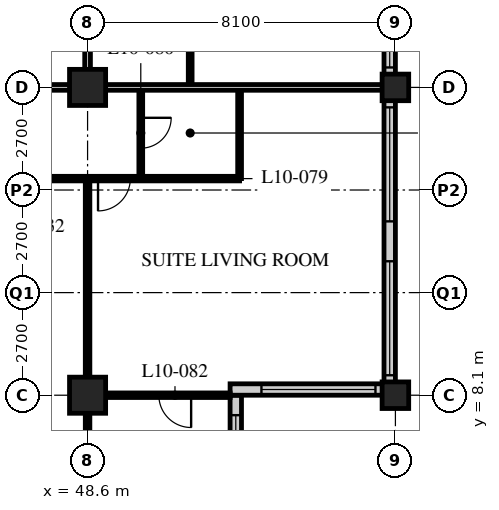
"""IFC4 building model, lengths in metres.
Left out: names, types, materials, properties, quantities, classifications, styles, units other than length and angle.
Written with IfcOpenShell. Run it as: python <this file> out.ifc"""

import sys

from ifc_helpers import new_model, si_unit, direction, frame, frame_2d, origin, origin_2d, place, context, subcontext, project, spatial, rectangle, hollow_rectangle, extrude, element, fill, save


model = new_model("IFC4")
c1 = context("Model", 3, precision=1e-05, world=origin(), true_north=direction((0.0, 1.0)))
c2 = subcontext(c1, "Body", "Model", "MODEL_VIEW")
j1 = project(units=[si_unit("LENGTHUNIT", "METRE"), si_unit("PLANEANGLEUNIT", "RADIAN")], contexts=[c1])
p1 = place(None, origin())
s1 = spatial("IfcSite", under=j1, at=p1, CompositionType="ELEMENT")
p2 = place(p1, origin())
s2 = spatial("IfcBuilding", under=s1, at=p2, CompositionType="ELEMENT")
p3 = place(p2, frame((0.0, 0.0, 46.6)))
s3 = spatial("IfcBuildingStorey", under=s2, at=p3, CompositionType="ELEMENT", Elevation=46.6)
for number, where, z_axis, x_axis in (
    (1, (48.6, 8.1, 0.0), (0.0, 0.0, 1.0), (1.0, 0.0, 0.0)),
    (2, (48.6, 16.2, 0.0), (0.0, 0.0, 1.0), (1.0, 0.0, 0.0)),
):
    element("IfcColumn", number, at=place(p3, frame(where, z_axis=z_axis, x_axis=x_axis)), inside=s3, PredefinedType="COLUMN", context=c2, shape_type="SweptSolid", body=[
        extrude(hollow_rectangle(XDim=0.95, YDim=0.95, WallThickness=0.095, at=origin_2d()), origin(), (0.0, 0.0, 1.0), 3.4),
    ])
for number, where, z_axis, x_axis in (
    (3, (56.7, 8.1, 0.0), (0.0, 0.0, 1.0), (1.0, 0.0, 0.0)),
    (4, (56.7, 16.2, 0.0), (0.0, 0.0, 1.0), (1.0, 0.0, 0.0)),
):
    element("IfcColumn", number, at=place(p3, frame(where, z_axis=z_axis, x_axis=x_axis)), inside=s3, PredefinedType="COLUMN", context=c2, shape_type="SweptSolid", body=[
        extrude(hollow_rectangle(XDim=0.7, YDim=0.7, WallThickness=0.06, at=origin_2d()), origin(), (0.0, 0.0, 1.0), 3.4),
    ])
p4 = place(p3, frame((52.5, 4.35, 0.0), z_axis=(0.0, 0.0, 1.0), x_axis=(0.0, 1.0, 0.0)))
e5 = element("IfcWall", 5, at=p4, inside=s3, PredefinedType="SOLIDWALL", context=c2, shape_type="SweptSolid", body=[
    extrude(rectangle(XDim=3.75, YDim=0.3, at=frame_2d((1.875, 0.0))), origin(), (0.0, 0.0, 1.0), 3.19),
])
p5 = place(p4, frame((0.225, 0.0, 0.9)))
e6 = element("IfcOpeningElement", 6, at=p5, cuts=e5, PredefinedType="OPENING", context=c2, shape_type="SweptSolid", body=[
    extrude(rectangle(XDim=3.0, YDim=1.5, at=frame_2d((1.5, 0.75))), frame((0.0, 0.16, 0.0), z_axis=(0.0, -1.0, 0.0), x_axis=(1.0, 0.0, 0.0)), (0.0, 0.0, 1.0), 0.32),
])
p6 = place(p3, frame((52.35, 8.25, 0.0), z_axis=(0.0, 0.0, 1.0), x_axis=(1.0, 0.0, 0.0)))
e7 = element("IfcWall", 7, at=p6, inside=s3, PredefinedType="SOLIDWALL", context=c2, shape_type="SweptSolid", body=[
    extrude(rectangle(XDim=4.35, YDim=0.3, at=frame_2d((2.175, 0.0))), origin(), (0.0, 0.0, 1.0), 3.19),
])
p7 = place(p6, frame((0.825, 0.0, 0.9)))
e8 = element("IfcOpeningElement", 8, at=p7, cuts=e7, PredefinedType="OPENING", context=c2, shape_type="SweptSolid", body=[
    extrude(rectangle(XDim=3.0, YDim=1.5, at=frame_2d((1.5, 0.75))), frame((0.0, 0.16, 0.0), z_axis=(0.0, -1.0, 0.0), x_axis=(1.0, 0.0, 0.0)), (0.0, 0.0, 1.0), 0.32),
])
p8 = place(p3, frame((56.55, 8.4, 0.0), z_axis=(0.0, 0.0, 1.0), x_axis=(0.0, 1.0, 0.0)))
e9 = element("IfcWall", 9, at=p8, inside=s3, PredefinedType="SOLIDWALL", context=c2, shape_type="SweptSolid", body=[
    extrude(rectangle(XDim=32.1, YDim=0.3, at=frame_2d((16.05, 0.0))), origin(), (0.0, 0.0, 1.0), 3.19),
])
p9 = place(p8, frame((0.225, 0.0, 0.9)))
e10 = element("IfcOpeningElement", 10, at=p9, cuts=e9, PredefinedType="OPENING", context=c2, shape_type="SweptSolid", body=[
    extrude(rectangle(XDim=3.0, YDim=2.0, at=frame_2d((1.5, 1.0))), frame((0.0, 0.16, 0.0), z_axis=(0.0, -1.0, 0.0), x_axis=(1.0, 0.0, 0.0)), (0.0, 0.0, 1.0), 0.32),
])
p10 = place(p8, frame((4.275, 0.0, 0.9)))
e11 = element("IfcOpeningElement", 11, at=p10, cuts=e9, PredefinedType="OPENING", context=c2, shape_type="SweptSolid", body=[
    extrude(rectangle(XDim=3.0, YDim=2.0, at=frame_2d((1.5, 1.0))), frame((0.0, 0.16, 0.0), z_axis=(0.0, -1.0, 0.0), x_axis=(1.0, 0.0, 0.0)), (0.0, 0.0, 1.0), 0.32),
])
p11 = place(p8, frame((8.325, 0.0, 0.9)))
e12 = element("IfcOpeningElement", 12, at=p11, cuts=e9, PredefinedType="OPENING", context=c2, shape_type="SweptSolid", body=[
    extrude(rectangle(XDim=3.0, YDim=2.0, at=frame_2d((1.5, 1.0))), frame((0.0, 0.16, 0.0), z_axis=(0.0, -1.0, 0.0), x_axis=(1.0, 0.0, 0.0)), (0.0, 0.0, 1.0), 0.32),
])
p12 = place(p8, frame((12.375, 0.0, 0.9)))
e13 = element("IfcOpeningElement", 13, at=p12, cuts=e9, PredefinedType="OPENING", context=c2, shape_type="SweptSolid", body=[
    extrude(rectangle(XDim=3.0, YDim=2.0, at=frame_2d((1.5, 1.0))), frame((0.0, 0.16, 0.0), z_axis=(0.0, -1.0, 0.0), x_axis=(1.0, 0.0, 0.0)), (0.0, 0.0, 1.0), 0.32),
])
p13 = place(p8, frame((16.425, 0.0, 0.9)))
e14 = element("IfcOpeningElement", 14, at=p13, cuts=e9, PredefinedType="OPENING", context=c2, shape_type="SweptSolid", body=[
    extrude(rectangle(XDim=3.0, YDim=2.0, at=frame_2d((1.5, 1.0))), frame((0.0, 0.16, 0.0), z_axis=(0.0, -1.0, 0.0), x_axis=(1.0, 0.0, 0.0)), (0.0, 0.0, 1.0), 0.32),
])
p14 = place(p8, frame((20.475, 0.0, 0.9)))
e15 = element("IfcOpeningElement", 15, at=p14, cuts=e9, PredefinedType="OPENING", context=c2, shape_type="SweptSolid", body=[
    extrude(rectangle(XDim=3.0, YDim=2.0, at=frame_2d((1.5, 1.0))), frame((0.0, 0.16, 0.0), z_axis=(0.0, -1.0, 0.0), x_axis=(1.0, 0.0, 0.0)), (0.0, 0.0, 1.0), 0.32),
])
p15 = place(p8, frame((24.525, 0.0, 0.9)))
e16 = element("IfcOpeningElement", 16, at=p15, cuts=e9, PredefinedType="OPENING", context=c2, shape_type="SweptSolid", body=[
    extrude(rectangle(XDim=3.0, YDim=2.0, at=frame_2d((1.5, 1.0))), frame((0.0, 0.16, 0.0), z_axis=(0.0, -1.0, 0.0), x_axis=(1.0, 0.0, 0.0)), (0.0, 0.0, 1.0), 0.32),
])
p16 = place(p8, frame((28.575, 0.0, 0.9)))
e17 = element("IfcOpeningElement", 17, at=p16, cuts=e9, PredefinedType="OPENING", context=c2, shape_type="SweptSolid", body=[
    extrude(rectangle(XDim=3.0, YDim=2.0, at=frame_2d((1.5, 1.0))), frame((0.0, 0.16, 0.0), z_axis=(0.0, -1.0, 0.0), x_axis=(1.0, 0.0, 0.0)), (0.0, 0.0, 1.0), 0.32),
])
p17 = place(p3, frame((8.1, 16.2, 0.0), z_axis=(0.0, 0.0, 1.0), x_axis=(1.0, 0.0, 0.0)))
e18 = element("IfcWall", 18, at=p17, inside=s3, PredefinedType="PARTITIONING", context=c2, shape_type="SweptSolid", body=[
    extrude(rectangle(XDim=40.5, YDim=0.15, at=frame_2d((20.25, 0.0))), origin(), (0.0, 0.0, 1.0), 2.578),
])
p18 = place(p17, frame((4.35, 0.0, 0.0)))
e19 = element("IfcOpeningElement", 19, at=p18, cuts=e18, PredefinedType="OPENING", context=c2, shape_type="SweptSolid", body=[
    extrude(rectangle(XDim=1.0, YDim=2.1, at=frame_2d((0.5, 1.05))), frame((0.0, 0.085, 0.0), z_axis=(0.0, -1.0, 0.0), x_axis=(1.0, 0.0, 0.0)), (0.0, 0.0, 1.0), 0.17),
])
p19 = place(p17, frame((10.85, 0.0, 0.0)))
e20 = element("IfcOpeningElement", 20, at=p19, cuts=e18, PredefinedType="OPENING", context=c2, shape_type="SweptSolid", body=[
    extrude(rectangle(XDim=1.0, YDim=2.1, at=frame_2d((0.5, 1.05))), frame((0.0, 0.085, 0.0), z_axis=(0.0, -1.0, 0.0), x_axis=(1.0, 0.0, 0.0)), (0.0, 0.0, 1.0), 0.17),
])
p20 = place(p17, frame((12.75, 0.0, 0.0)))
e21 = element("IfcOpeningElement", 21, at=p20, cuts=e18, PredefinedType="OPENING", context=c2, shape_type="SweptSolid", body=[
    extrude(rectangle(XDim=1.0, YDim=2.1, at=frame_2d((0.5, 1.05))), frame((0.0, 0.085, 0.0), z_axis=(0.0, -1.0, 0.0), x_axis=(1.0, 0.0, 0.0)), (0.0, 0.0, 1.0), 0.17),
])
p21 = place(p17, frame((18.95, 0.0, 0.0)))
e22 = element("IfcOpeningElement", 22, at=p21, cuts=e18, PredefinedType="OPENING", context=c2, shape_type="SweptSolid", body=[
    extrude(rectangle(XDim=1.0, YDim=2.1, at=frame_2d((0.5, 1.05))), frame((0.0, 0.085, 0.0), z_axis=(0.0, -1.0, 0.0), x_axis=(1.0, 0.0, 0.0)), (0.0, 0.0, 1.0), 0.17),
])
p22 = place(p17, frame((20.55, 0.0, 0.0)))
e23 = element("IfcOpeningElement", 23, at=p22, cuts=e18, PredefinedType="OPENING", context=c2, shape_type="SweptSolid", body=[
    extrude(rectangle(XDim=1.0, YDim=2.1, at=frame_2d((0.5, 1.05))), frame((0.0, 0.085, 0.0), z_axis=(0.0, -1.0, 0.0), x_axis=(1.0, 0.0, 0.0)), (0.0, 0.0, 1.0), 0.17),
])
p23 = place(p17, frame((27.05, 0.0, 0.0)))
e24 = element("IfcOpeningElement", 24, at=p23, cuts=e18, PredefinedType="OPENING", context=c2, shape_type="SweptSolid", body=[
    extrude(rectangle(XDim=1.0, YDim=2.1, at=frame_2d((0.5, 1.05))), frame((0.0, 0.085, 0.0), z_axis=(0.0, -1.0, 0.0), x_axis=(1.0, 0.0, 0.0)), (0.0, 0.0, 1.0), 0.17),
])
p24 = place(p17, frame((28.95, 0.0, 0.0)))
e25 = element("IfcOpeningElement", 25, at=p24, cuts=e18, PredefinedType="OPENING", context=c2, shape_type="SweptSolid", body=[
    extrude(rectangle(XDim=1.0, YDim=2.1, at=frame_2d((0.5, 1.05))), frame((0.0, 0.085, 0.0), z_axis=(0.0, -1.0, 0.0), x_axis=(1.0, 0.0, 0.0)), (0.0, 0.0, 1.0), 0.17),
])
p25 = place(p17, frame((34.85, 0.0, 0.0)))
e26 = element("IfcOpeningElement", 26, at=p25, cuts=e18, PredefinedType="OPENING", context=c2, shape_type="SweptSolid", body=[
    extrude(rectangle(XDim=1.0, YDim=2.1, at=frame_2d((0.5, 1.05))), frame((0.0, 0.085, 0.0), z_axis=(0.0, -1.0, 0.0), x_axis=(1.0, 0.0, 0.0)), (0.0, 0.0, 1.0), 0.17),
])
p26 = place(p17, frame((1.525, 0.0, 0.0)))
e27 = element("IfcOpeningElement", 27, at=p26, cuts=e18, PredefinedType="OPENING", context=c2, shape_type="SweptSolid", body=[
    extrude(rectangle(XDim=1.0, YDim=2.1, at=frame_2d((0.5, 1.05))), frame((0.0, 0.085, 0.0), z_axis=(0.0, -1.0, 0.0), x_axis=(1.0, 0.0, 0.0)), (0.0, 0.0, 1.0), 0.17),
])
p27 = place(p17, frame((37.975, 0.0, 0.0)))
e28 = element("IfcOpeningElement", 28, at=p27, cuts=e18, PredefinedType="OPENING", context=c2, shape_type="SweptSolid", body=[
    extrude(rectangle(XDim=1.0, YDim=2.1, at=frame_2d((0.5, 1.05))), frame((0.0, 0.085, 0.0), z_axis=(0.0, -1.0, 0.0), x_axis=(1.0, 0.0, 0.0)), (0.0, 0.0, 1.0), 0.17),
])
p28 = place(p3, frame((48.6, 16.2, 0.0), z_axis=(0.0, 0.0, 1.0), x_axis=(0.0, 1.0, 0.0)))
e29 = element("IfcWall", 29, at=p28, inside=s3, PredefinedType="PARTITIONING", context=c2, shape_type="SweptSolid", body=[
    extrude(rectangle(XDim=26.1, YDim=0.15, at=frame_2d((13.05, 0.0))), origin(), (0.0, 0.0, 1.0), 2.578),
])
p29 = place(p28, frame((2.75, 0.0, 0.0)))
e30 = element("IfcOpeningElement", 30, at=p29, cuts=e29, PredefinedType="OPENING", context=c2, shape_type="SweptSolid", body=[
    extrude(rectangle(XDim=1.0, YDim=2.1, at=frame_2d((0.5, 1.05))), frame((0.0, 0.085, 0.0), z_axis=(0.0, -1.0, 0.0), x_axis=(1.0, 0.0, 0.0)), (0.0, 0.0, 1.0), 0.17),
])
p30 = place(p28, frame((4.35, 0.0, 0.0)))
e31 = element("IfcOpeningElement", 31, at=p30, cuts=e29, PredefinedType="OPENING", context=c2, shape_type="SweptSolid", body=[
    extrude(rectangle(XDim=1.0, YDim=2.1, at=frame_2d((0.5, 1.05))), frame((0.0, 0.085, 0.0), z_axis=(0.0, -1.0, 0.0), x_axis=(1.0, 0.0, 0.0)), (0.0, 0.0, 1.0), 0.17),
])
p31 = place(p28, frame((10.85, 0.0, 0.0)))
e32 = element("IfcOpeningElement", 32, at=p31, cuts=e29, PredefinedType="OPENING", context=c2, shape_type="SweptSolid", body=[
    extrude(rectangle(XDim=1.0, YDim=2.1, at=frame_2d((0.5, 1.05))), frame((0.0, 0.085, 0.0), z_axis=(0.0, -1.0, 0.0), x_axis=(1.0, 0.0, 0.0)), (0.0, 0.0, 1.0), 0.17),
])
p32 = place(p28, frame((12.45, 0.0, 0.0)))
e33 = element("IfcOpeningElement", 33, at=p32, cuts=e29, PredefinedType="OPENING", context=c2, shape_type="SweptSolid", body=[
    extrude(rectangle(XDim=1.0, YDim=2.1, at=frame_2d((0.5, 1.05))), frame((0.0, 0.085, 0.0), z_axis=(0.0, -1.0, 0.0), x_axis=(1.0, 0.0, 0.0)), (0.0, 0.0, 1.0), 0.17),
])
p33 = place(p28, frame((18.65, 0.0, 0.0)))
e34 = element("IfcOpeningElement", 34, at=p33, cuts=e29, PredefinedType="OPENING", context=c2, shape_type="SweptSolid", body=[
    extrude(rectangle(XDim=1.0, YDim=2.1, at=frame_2d((0.5, 1.05))), frame((0.0, 0.085, 0.0), z_axis=(0.0, -1.0, 0.0), x_axis=(1.0, 0.0, 0.0)), (0.0, 0.0, 1.0), 0.17),
])
p34 = place(p28, frame((22.7, 0.0, 0.0)))
e35 = element("IfcOpeningElement", 35, at=p34, cuts=e29, PredefinedType="OPENING", context=c2, shape_type="SweptSolid", body=[
    extrude(rectangle(XDim=1.0, YDim=2.1, at=frame_2d((0.5, 1.05))), frame((0.0, 0.085, 0.0), z_axis=(0.0, -1.0, 0.0), x_axis=(1.0, 0.0, 0.0)), (0.0, 0.0, 1.0), 0.17),
])
p35 = place(p3, frame((51.3, 16.2, 0.0), z_axis=(0.0, 0.0, 1.0), x_axis=(0.0, 1.0, 0.0)))
e36 = element("IfcWall", 36, at=p35, inside=s3, PredefinedType="PARTITIONING", context=c2, shape_type="SweptSolid", body=[
    extrude(rectangle(XDim=2.6, YDim=0.1, at=frame_2d((1.3, 0.0))), origin(), (0.0, 0.0, 1.0), 3.19),
])
p36 = place(p3, frame((44.55, 13.8, 0.0), z_axis=(0.0, 0.0, 1.0), x_axis=(1.0, 0.0, 0.0)))
e37 = element("IfcWall", 37, at=p36, inside=s3, PredefinedType="PARTITIONING", context=c2, shape_type="SweptSolid", body=[
    extrude(rectangle(XDim=8.05, YDim=0.12, at=frame_2d((4.025, 0.0))), origin(), (0.0, 0.0, 1.0), 3.19),
])
p37 = place(p36, frame((0.475, 0.0, 0.0)))
e38 = element("IfcOpeningElement", 38, at=p37, cuts=e37, PredefinedType="OPENING", context=c2, shape_type="SweptSolid", body=[
    extrude(rectangle(XDim=0.85, YDim=2.1, at=frame_2d((0.425, 1.05))), frame((0.0, 0.07, 0.0), z_axis=(0.0, -1.0, 0.0), x_axis=(1.0, 0.0, 0.0)), (0.0, 0.0, 1.0), 0.14),
])
p38 = place(p36, frame((4.325, 0.0, 0.0)))
e39 = element("IfcOpeningElement", 39, at=p38, cuts=e37, PredefinedType="OPENING", context=c2, shape_type="SweptSolid", body=[
    extrude(rectangle(XDim=0.85, YDim=2.1, at=frame_2d((0.425, 1.05))), frame((0.0, 0.07, 0.0), z_axis=(0.0, -1.0, 0.0), x_axis=(1.0, 0.0, 0.0)), (0.0, 0.0, 1.0), 0.14),
])
p39 = place(p3, frame((50.0, 16.2, 0.0), z_axis=(0.0, 0.0, 1.0), x_axis=(0.0, -1.0, 0.0)))
e40 = element("IfcWall", 40, at=p39, inside=s3, PredefinedType="PARTITIONING", context=c2, shape_type="SweptSolid", body=[
    extrude(rectangle(XDim=2.4, YDim=0.1, at=frame_2d((1.2, 0.0))), origin(), (0.0, 0.0, 1.0), 3.19),
])
p40 = place(p39, frame((0.8, 0.0, 0.0)))
e41 = element("IfcOpeningElement", 41, at=p40, cuts=e40, PredefinedType="OPENING", context=c2, shape_type="SweptSolid", body=[
    extrude(rectangle(XDim=0.8, YDim=2.1, at=frame_2d((0.4, 1.05))), frame((0.0, 0.06, 0.0), z_axis=(0.0, -1.0, 0.0), x_axis=(1.0, 0.0, 0.0)), (0.0, 0.0, 1.0), 0.12),
])
p41 = place(p3, frame((52.6, 16.2, 0.0), z_axis=(0.0, 0.0, 1.0), x_axis=(0.0, -1.0, 0.0)))
e42 = element("IfcWall", 42, at=p41, inside=s3, PredefinedType="PARTITIONING", context=c2, shape_type="SweptSolid", body=[
    extrude(rectangle(XDim=2.4, YDim=0.1, at=frame_2d((1.2, 0.0))), origin(), (0.0, 0.0, 1.0), 3.19),
])
p42 = place(p3, frame((48.6, 13.8, 0.0), z_axis=(0.0, 0.0, 1.0), x_axis=(0.0, -1.0, 0.0)))
e43 = element("IfcWall", 43, at=p42, inside=s3, PredefinedType="PARTITIONING", context=c2, shape_type="SweptSolid", body=[
    extrude(rectangle(XDim=9.45, YDim=0.12, at=frame_2d((4.725, 0.0))), origin(), (0.0, 0.0, 1.0), 2.578),
])
p43 = place(p3, frame((48.6, 8.1, 0.0), z_axis=(0.0, 0.0, 1.0), x_axis=(1.0, 0.0, 0.0)))
e44 = element("IfcWall", 44, at=p43, inside=s3, PredefinedType="PARTITIONING", context=c2, shape_type="SweptSolid", body=[
    extrude(rectangle(XDim=3.75, YDim=0.12, at=frame_2d((1.875, 0.0))), origin(), (0.0, 0.0, 1.0), 2.578),
])
p44 = place(p43, frame((1.875, 0.0, 0.0)))
e45 = element("IfcOpeningElement", 45, at=p44, cuts=e44, PredefinedType="OPENING", context=c2, shape_type="SweptSolid", body=[
    extrude(rectangle(XDim=0.85, YDim=2.1, at=frame_2d((0.425, 1.05))), frame((0.0, 0.07, 0.0), z_axis=(0.0, -1.0, 0.0), x_axis=(1.0, 0.0, 0.0)), (0.0, 0.0, 1.0), 0.14),
])
p45 = place(p3, frame((48.6, 16.2, 0.0), z_axis=(0.0, 0.0, 1.0), x_axis=(1.0, 0.0, 0.0)))
e46 = element("IfcWall", 46, at=p45, inside=s3, PredefinedType="PARTITIONING", context=c2, shape_type="SweptSolid", body=[
    extrude(rectangle(XDim=7.8, YDim=0.15, at=frame_2d((3.9, 0.0))), origin(), (0.0, 0.0, 1.0), 2.578),
])
p46 = place(p5, origin())
e47 = element("IfcWindow", 47, at=p46, inside=s3, PartitioningType="SINGLE_PANEL", PredefinedType="WINDOW", context=c2, shape_type="SweptSolid", body=[
    extrude(rectangle(XDim=3.0, YDim=1.5, at=frame_2d((1.5, 0.75))), frame((0.0, 0.03, 0.0), z_axis=(0.0, -1.0, 0.0), x_axis=(1.0, 0.0, 0.0)), (0.0, 0.0, 1.0), 0.06),
])
fill(e6, e47)
p47 = place(p7, origin())
e48 = element("IfcWindow", 48, at=p47, inside=s3, PartitioningType="SINGLE_PANEL", PredefinedType="WINDOW", context=c2, shape_type="SweptSolid", body=[
    extrude(rectangle(XDim=3.0, YDim=1.5, at=frame_2d((1.5, 0.75))), frame((0.0, 0.03, 0.0), z_axis=(0.0, -1.0, 0.0), x_axis=(1.0, 0.0, 0.0)), (0.0, 0.0, 1.0), 0.06),
])
fill(e8, e48)
p48 = place(p9, origin())
e49 = element("IfcWindow", 49, at=p48, inside=s3, PartitioningType="SINGLE_PANEL", PredefinedType="WINDOW", context=c2, shape_type="SweptSolid", body=[
    extrude(rectangle(XDim=3.0, YDim=2.0, at=frame_2d((1.5, 1.0))), frame((0.0, 0.03, 0.0), z_axis=(0.0, -1.0, 0.0), x_axis=(1.0, 0.0, 0.0)), (0.0, 0.0, 1.0), 0.06),
])
fill(e10, e49)
p49 = place(p10, origin())
e50 = element("IfcWindow", 50, at=p49, inside=s3, PartitioningType="SINGLE_PANEL", PredefinedType="WINDOW", context=c2, shape_type="SweptSolid", body=[
    extrude(rectangle(XDim=3.0, YDim=2.0, at=frame_2d((1.5, 1.0))), frame((0.0, 0.03, 0.0), z_axis=(0.0, -1.0, 0.0), x_axis=(1.0, 0.0, 0.0)), (0.0, 0.0, 1.0), 0.06),
])
fill(e11, e50)
p50 = place(p11, origin())
e51 = element("IfcWindow", 51, at=p50, inside=s3, PartitioningType="SINGLE_PANEL", PredefinedType="WINDOW", context=c2, shape_type="SweptSolid", body=[
    extrude(rectangle(XDim=3.0, YDim=2.0, at=frame_2d((1.5, 1.0))), frame((0.0, 0.03, 0.0), z_axis=(0.0, -1.0, 0.0), x_axis=(1.0, 0.0, 0.0)), (0.0, 0.0, 1.0), 0.06),
])
fill(e12, e51)
p51 = place(p40, origin())
e52 = element("IfcDoor", 52, at=p51, inside=s3, OperationType="SINGLE_SWING_LEFT", PredefinedType="DOOR", context=c2, shape_type="SweptSolid", body=[
    extrude(rectangle(XDim=0.8, YDim=2.1, at=frame_2d((0.4, 1.05))), frame((0.0, 0.025, 0.0), z_axis=(0.0, -1.0, 0.0), x_axis=(1.0, 0.0, 0.0)), (0.0, 0.0, 1.0), 0.05),
])
fill(e41, e52)
p52 = place(p38, origin())
e53 = element("IfcDoor", 53, at=p52, inside=s3, OperationType="SINGLE_SWING_RIGHT", PredefinedType="DOOR", context=c2, shape_type="SweptSolid", body=[
    extrude(rectangle(XDim=0.85, YDim=2.1, at=frame_2d((0.425, 1.05))), frame((0.0, 0.025, 0.0), z_axis=(0.0, -1.0, 0.0), x_axis=(1.0, 0.0, 0.0)), (0.0, 0.0, 1.0), 0.05),
])
fill(e39, e53)
p53 = place(p44, origin())
e54 = element("IfcDoor", 54, at=p53, inside=s3, OperationType="SINGLE_SWING_LEFT", PredefinedType="DOOR", context=c2, shape_type="SweptSolid", body=[
    extrude(rectangle(XDim=0.85, YDim=2.1, at=frame_2d((0.425, 1.05))), frame((0.0, 0.025, 0.0), z_axis=(0.0, -1.0, 0.0), x_axis=(1.0, 0.0, 0.0)), (0.0, 0.0, 1.0), 0.05),
])
fill(e45, e54)
save(model, sys.argv[1])
